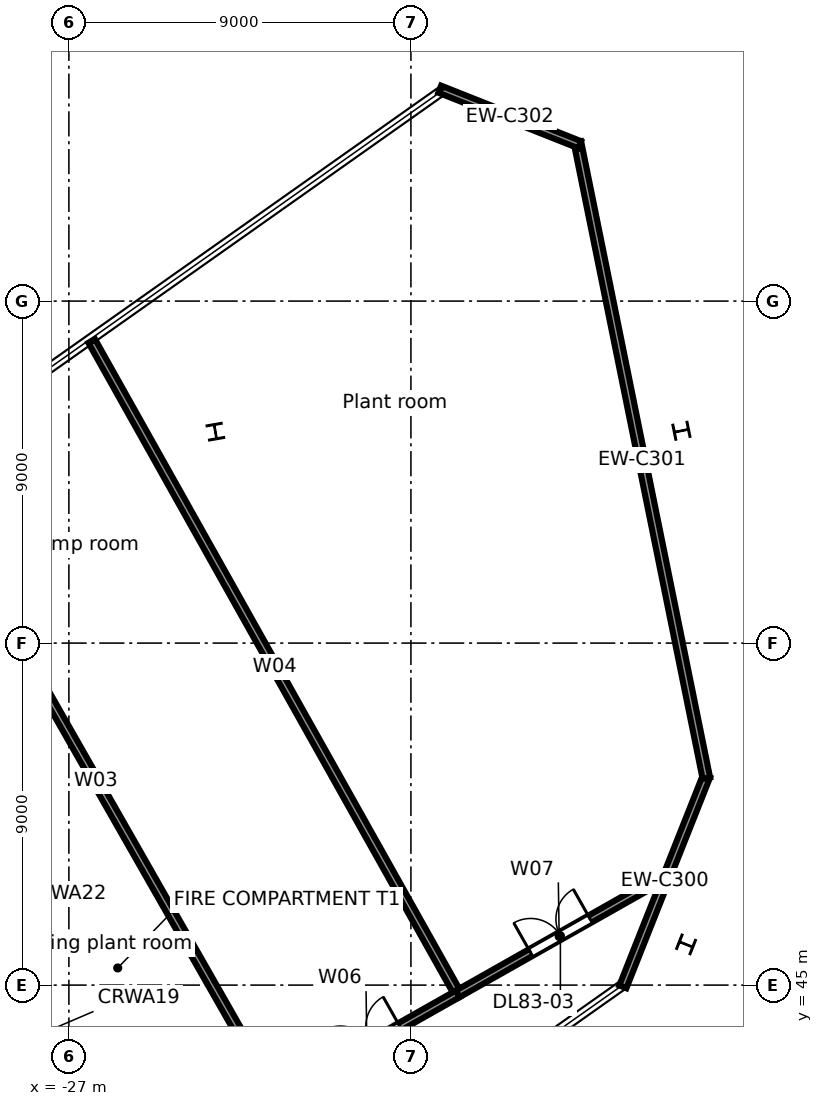
"""IFC4 building model, lengths in metres.
Left out: names, types, materials, properties, quantities, classifications, styles, units other than length and angle.
Written with IfcOpenShell. Run it as: python <this file> out.ifc"""

import sys

from ifc_helpers import new_model, si_unit, direction, frame, frame_2d, origin, origin_2d, place, context, subcontext, project, spatial, rectangle, i_section, extrude, element, fill, save


model = new_model("IFC4")
c1 = context("Model", 3, precision=1e-05, world=origin(), true_north=direction((0.0, 1.0)))
c2 = subcontext(c1, "Body", "Model", "MODEL_VIEW")
j1 = project(units=[si_unit("LENGTHUNIT", "METRE"), si_unit("PLANEANGLEUNIT", "RADIAN")], contexts=[c1])
p1 = place(None, origin())
s1 = spatial("IfcSite", under=j1, at=p1, CompositionType="ELEMENT")
p2 = place(p1, origin())
s2 = spatial("IfcBuilding", under=s1, at=p2, CompositionType="ELEMENT")
p3 = place(p2, frame((0.0, 0.0, 364.9)))
s3 = spatial("IfcBuildingStorey", under=s2, at=p3, CompositionType="ELEMENT", Elevation=364.9)
for number, where, z_axis, x_axis in (
    (1, (-10.76, 46.071, 0.0), (0.0, 0.0, 1.0), (0.369, 0.929, 0.0)),
    (2, (-10.882, 59.587, 0.0), (0.0, 0.0, 1.0), (-0.199, 0.98, 0.0)),
    (3, (-23.146, 59.563, 0.0), (0.0, 0.0, 1.0), (0.985, 0.171, 0.0)),
):
    element("IfcColumn", number, at=place(p3, frame(where, z_axis=z_axis, x_axis=x_axis)), inside=s3, PredefinedType="COLUMN", context=c2, shape_type="SweptSolid", body=[
        extrude(i_section(OverallWidth=0.4, OverallDepth=0.4, WebThickness=0.013, FlangeThickness=0.021, FilletRadius=0.022, at=origin_2d()), origin(), (0.0, 0.0, 1.0), 3.6),
    ])
p4 = place(p3, frame((-10.22, 50.501, 0.0), z_axis=(0.0, 0.0, 1.0), x_axis=(-0.369026712049, -0.929418789241, 0.0)))
e4 = element("IfcWall", 4, at=p4, inside=s3, PredefinedType="STANDARD", context=c2, shape_type="SweptSolid", body=[
    extrude(rectangle(XDim=5.968, YDim=0.2, at=frame_2d((2.984, 0.0))), origin(), (0.0, 0.0, 1.0), 2.7),
])
p5 = place(p3, frame((-13.62, 67.188, 0.0), z_axis=(0.0, 0.0, 1.0), x_axis=(0.198668549131, -0.980066736292, 0.0)))
e5 = element("IfcWall", 5, at=p5, inside=s3, PredefinedType="STANDARD", context=c2, shape_type="SweptSolid", body=[
    extrude(rectangle(XDim=17.084, YDim=0.2, at=frame_2d((8.542, 0.0))), origin(), (0.0, 0.0, 1.0), 2.7),
])
p6 = place(p3, frame((-17.241, 68.577, 0.0), z_axis=(0.0, 0.0, 1.0), x_axis=(0.929408544005, -0.369052514325, 0.0)))
e6 = element("IfcWall", 6, at=p6, inside=s3, PredefinedType="STANDARD", context=c2, shape_type="SweptSolid", body=[
    extrude(rectangle(XDim=3.963, YDim=0.2, at=frame_2d((1.981, 0.0))), origin(), (0.0, 0.0, 1.0), 3.3),
])
p7 = place(p3, frame((-31.792, 49.653, 0.0), z_axis=(0.0, 0.0, 1.0), x_axis=(0.492421943245, -0.870356610712, 0.0)))
e7 = element("IfcWall", 7, at=p7, inside=s3, PredefinedType="SOLIDWALL", context=c2, shape_type="SweptSolid", body=[
    extrude(rectangle(XDim=13.3, YDim=0.35, at=frame_2d((6.65, 0.0))), origin(), (0.0, 0.0, 1.0), 3.3),
])
p8 = place(p3, frame((-31.031, 58.679, 0.0), z_axis=(0.0, 0.0, 1.0), x_axis=(0.495492853456, -0.868612014753, 0.0)))
e8 = element("IfcWall", 8, at=p8, inside=s3, PredefinedType="PARTITIONING", context=c2, shape_type="SweptSolid", body=[
    extrude(rectangle(XDim=19.13, YDim=0.2, at=frame_2d((9.565, 0.0))), origin(), (0.0, 0.0, 1.0), 2.68),
])
p9 = place(p3, frame((-26.399, 61.95, 0.0), z_axis=(0.0, 0.0, 1.0), x_axis=(0.489116217078, -0.872218622933, 0.0)))
e9 = element("IfcWall", 9, at=p9, inside=s3, PredefinedType="PARTITIONING", context=c2, shape_type="SweptSolid", body=[
    extrude(rectangle(XDim=19.697, YDim=0.2, at=frame_2d((9.848, 0.0))), origin(), (0.0, 0.0, 1.0), 2.68),
])
p10 = place(p3, frame((-21.552, 42.062, 0.0), z_axis=(0.0, 0.0, 1.0), x_axis=(0.870387515286, 0.492367315359, 0.0)))
e10 = element("IfcWall", 10, at=p10, inside=s3, PredefinedType="PARTITIONING", context=c2, shape_type="SweptSolid", body=[
    extrude(rectangle(XDim=5.5, YDim=0.2, at=frame_2d((2.75, 0.0))), origin(), (0.0, 0.0, 1.0), 3.3),
])
p11 = place(p10, frame((1.95, 0.0, 0.0)))
e11 = element("IfcOpeningElement", 11, at=p11, cuts=e10, PredefinedType="OPENING", context=c2, shape_type="SweptSolid", body=[
    extrude(rectangle(XDim=1.8, YDim=2.1, at=frame_2d((0.9, 1.05))), frame((0.0, 0.11, 0.0), z_axis=(0.0, -1.0, 0.0), x_axis=(1.0, 0.0, 0.0)), (0.0, 0.0, 1.0), 0.22),
])
p12 = place(p3, frame((-16.765, 44.77, 0.0), z_axis=(0.0, 0.0, 1.0), x_axis=(0.870320026037, 0.492486601116, 0.0)))
e12 = element("IfcWall", 12, at=p12, inside=s3, PredefinedType="PARTITIONING", context=c2, shape_type="SweptSolid", body=[
    extrude(rectangle(XDim=6.126, YDim=0.2, at=frame_2d((3.063, 0.0))), origin(), (0.0, 0.0, 1.0), 3.3),
])
p13 = place(p12, frame((2.2, 0.0, 0.0)))
e13 = element("IfcOpeningElement", 13, at=p13, cuts=e12, PredefinedType="OPENING", context=c2, shape_type="SweptSolid", body=[
    extrude(rectangle(XDim=1.8, YDim=2.1, at=frame_2d((0.9, 1.05))), frame((0.0, 0.11, 0.0), z_axis=(0.0, -1.0, 0.0), x_axis=(1.0, 0.0, 0.0)), (0.0, 0.0, 1.0), 0.22),
])
p14 = place(p11, origin())
e14 = element("IfcDoor", 14, at=p14, inside=s3, OperationType="DOUBLE_DOOR_SINGLE_SWING", PredefinedType="DOOR", context=c2, shape_type="SweptSolid", body=[
    extrude(rectangle(XDim=1.8, YDim=2.1, at=frame_2d((0.9, 1.05))), frame((0.0, 0.025, 0.0), z_axis=(0.0, -1.0, 0.0), x_axis=(1.0, 0.0, 0.0)), (0.0, 0.0, 1.0), 0.05),
])
fill(e11, e14)
p15 = place(p13, origin())
e15 = element("IfcDoor", 15, at=p15, inside=s3, OperationType="DOUBLE_DOOR_SINGLE_SWING", PredefinedType="DOOR", context=c2, shape_type="SweptSolid", body=[
    extrude(rectangle(XDim=1.8, YDim=2.1, at=frame_2d((0.9, 1.05))), frame((0.0, 0.025, 0.0), z_axis=(0.0, -1.0, 0.0), x_axis=(1.0, 0.0, 0.0)), (0.0, 0.0, 1.0), 0.05),
])
fill(e13, e15)
save(model, sys.argv[1])
